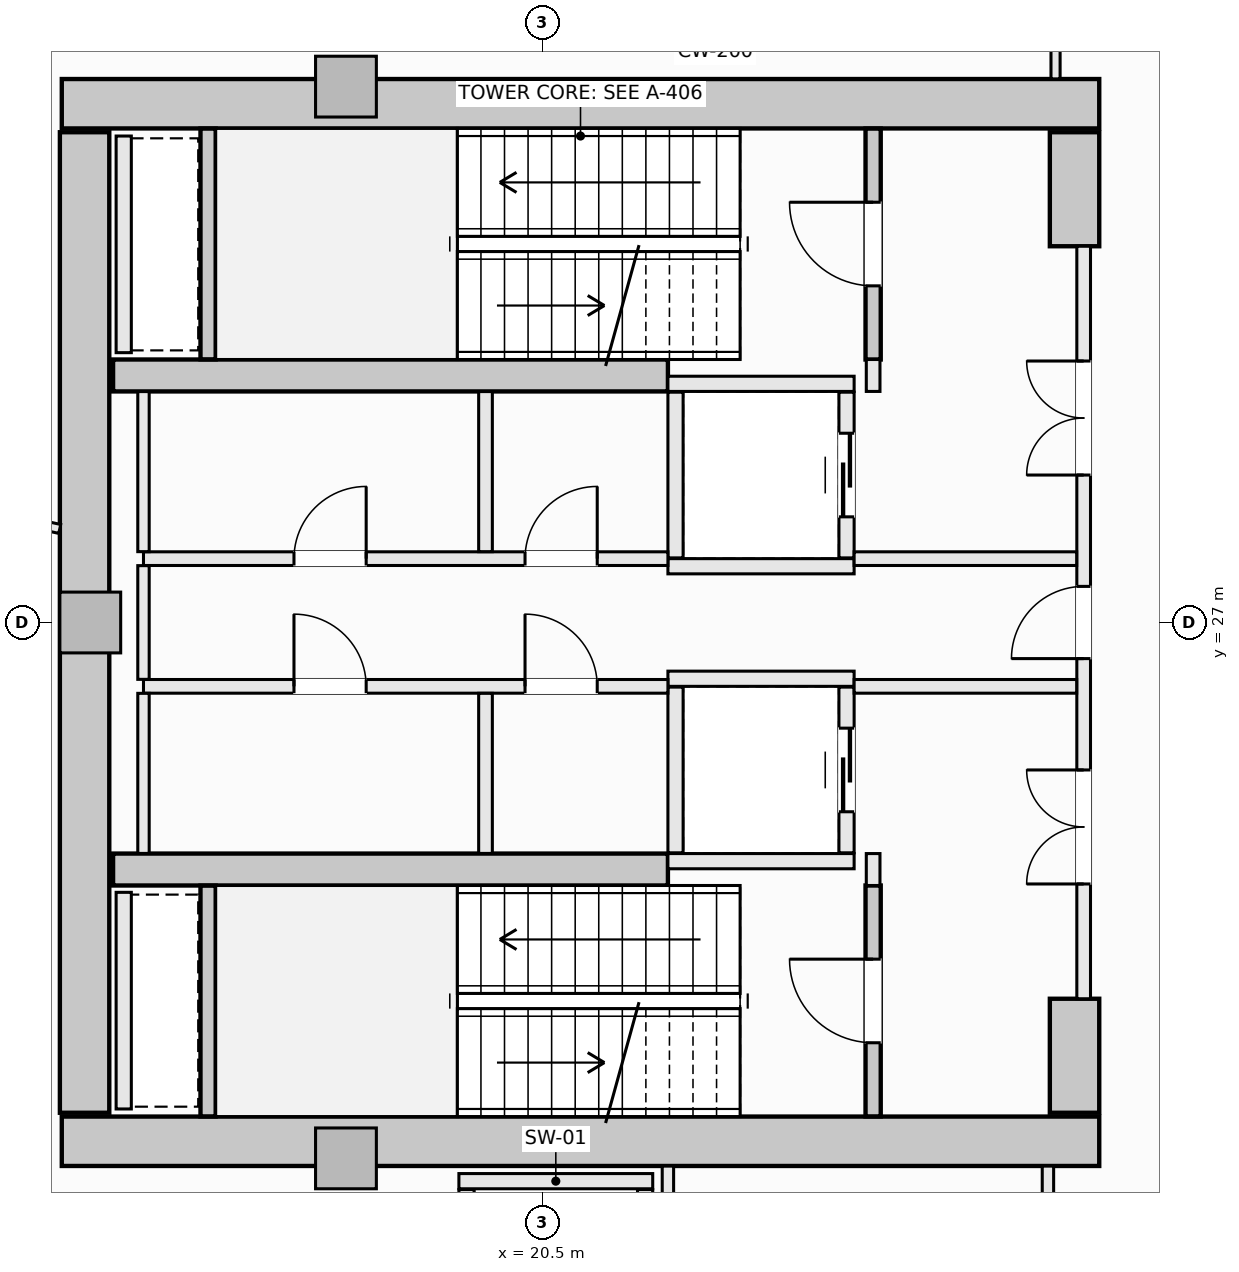
"""IFC4 building model, lengths in metres.
Left out: names, types, materials, properties, quantities, classifications, styles, units other than length and angle.
Written with IfcOpenShell. Run it as: python <this file> out.ifc"""

import sys

from ifc_helpers import new_model, si_unit, direction, frame, frame_2d, origin, origin_2d, place, context, subcontext, project, spatial, rectangle, extrude, element, fill, save


model = new_model("IFC4")
c1 = context("Model", 3, precision=1e-05, world=origin(), true_north=direction((0.0, 1.0)))
c2 = subcontext(c1, "Body", "Model", "MODEL_VIEW")
j1 = project(units=[si_unit("LENGTHUNIT", "METRE"), si_unit("PLANEANGLEUNIT", "RADIAN")], contexts=[c1])
p1 = place(None, origin())
s1 = spatial("IfcSite", under=j1, at=p1, CompositionType="ELEMENT")
p2 = place(p1, origin())
s2 = spatial("IfcBuilding", under=s1, at=p2, CompositionType="ELEMENT")
p3 = place(p2, frame((0.0, 0.0, 100.8)))
s3 = spatial("IfcBuildingStorey", under=s2, at=p3, CompositionType="ELEMENT", Elevation=100.8)
for number, where, z_axis, x_axis in (
    (1, (14.175, 33.825, -0.28), (0.0, 0.0, 1.0), (1.0, 0.0, 0.0)),
    (2, (14.175, 20.175, -0.28), (0.0, 0.0, 1.0), (1.0, 0.0, 0.0)),
):
    element("IfcWall", number, at=place(p3, frame(where, z_axis=z_axis, x_axis=x_axis)), inside=s3, PredefinedType="SHEAR", context=c2, shape_type="SweptSolid", body=[
        extrude(rectangle(XDim=13.65, YDim=0.65, at=frame_2d((6.825, 0.0))), origin(), (0.0, 0.0, 1.0), 4.51),
    ])
p4 = place(p3, frame((14.475, 20.55, -0.28), z_axis=(0.0, 0.0, 1.0), x_axis=(0.0, 1.0, 0.0)))
e3 = element("IfcWall", 3, at=p4, inside=s3, PredefinedType="SHEAR", context=c2, shape_type="SweptSolid", body=[
    extrude(rectangle(XDim=12.9, YDim=0.65, at=frame_2d((6.45, 0.0))), origin(), (0.0, 0.0, 1.0), 4.51),
])
for number, where, z_axis, x_axis in (
    (4, (27.5, 31.95, -0.28), (0.0, 0.0, 1.0), (0.0, 1.0, 0.0)),
    (5, (27.5, 20.55, -0.28), (0.0, 0.0, 1.0), (0.0, 1.0, 0.0)),
):
    element("IfcWall", number, at=place(p3, frame(where, z_axis=z_axis, x_axis=x_axis)), inside=s3, PredefinedType="SHEAR", context=c2, shape_type="SweptSolid", body=[
        extrude(rectangle(XDim=1.5, YDim=0.65, at=frame_2d((0.75, 0.0))), origin(), (0.0, 0.0, 1.0), 4.51),
    ])
for number, where, z_axis, x_axis in (
    (6, (14.85, 30.25, -0.28), (0.0, 0.0, 1.0), (1.0, 0.0, 0.0)),
    (7, (14.85, 23.75, -0.28), (0.0, 0.0, 1.0), (1.0, 0.0, 0.0)),
):
    element("IfcWall", number, at=place(p3, frame(where, z_axis=z_axis, x_axis=x_axis)), inside=s3, PredefinedType="SHEAR", context=c2, shape_type="SweptSolid", body=[
        extrude(rectangle(XDim=7.3, YDim=0.42, at=frame_2d((3.65, 0.0))), origin(), (0.0, 0.0, 1.0), 4.51),
    ])
for number, where, z_axis, x_axis in (
    (8, (17.914, 34.05, -0.28), (0.0, 0.0, 1.0), (1.0, 0.0, 0.0)),
    (9, (14.55, 27.0, -0.28), (0.0, 0.0, 1.0), (1.0, 0.0, 0.0)),
    (10, (17.914, 19.95, -0.28), (0.0, 0.0, 1.0), (1.0, 0.0, 0.0)),
):
    element("IfcColumn", number, at=place(p3, frame(where, z_axis=z_axis, x_axis=x_axis)), inside=s3, PredefinedType="PILASTER", context=c2, shape_type="SweptSolid", body=[
        extrude(rectangle(XDim=0.8, YDim=0.8, at=origin_2d()), origin(), (0.0, 0.0, 1.0), 4.51),
    ])
p5 = place(p3, frame((24.85, 30.46, -0.28), z_axis=(0.0, 0.0, 1.0), x_axis=(0.0, 1.0, 0.0)))
e11 = element("IfcWall", 11, at=p5, inside=s3, PredefinedType="SHEAR", context=c2, shape_type="SweptSolid", body=[
    extrude(rectangle(XDim=3.038, YDim=0.2, at=frame_2d((1.519, 0.0))), origin(), (0.0, 0.0, 1.0), 4.51),
])
p6 = place(p5, frame((0.969, 0.0, 0.28)))
e12 = element("IfcOpeningElement", 12, at=p6, cuts=e11, PredefinedType="OPENING", context=c2, shape_type="SweptSolid", body=[
    extrude(rectangle(XDim=1.1, YDim=2.15, at=frame_2d((0.55, 1.075))), frame((0.0, 0.11, 0.0), z_axis=(0.0, -1.0, 0.0), x_axis=(1.0, 0.0, 0.0)), (0.0, 0.0, 1.0), 0.22),
])
p7 = place(p3, frame((16.1, 30.462, -0.28), z_axis=(0.0, 0.0, 1.0), x_axis=(0.0, 1.0, 0.0)))
e13 = element("IfcWall", 13, at=p7, inside=s3, PredefinedType="SHEAR", context=c2, shape_type="SweptSolid", body=[
    extrude(rectangle(XDim=3.036, YDim=0.2, at=frame_2d((1.518, 0.0))), origin(), (0.0, 0.0, 1.0), 4.51),
])
p8 = place(p3, frame((24.85, 20.502, -0.28), z_axis=(0.0, 0.0, 1.0), x_axis=(0.0, 1.0, 0.0)))
e14 = element("IfcWall", 14, at=p8, inside=s3, PredefinedType="SHEAR", context=c2, shape_type="SweptSolid", body=[
    extrude(rectangle(XDim=3.038, YDim=0.2, at=frame_2d((1.519, 0.0))), origin(), (0.0, 0.0, 1.0), 4.51),
])
p9 = place(p8, frame((0.969, 0.0, 0.28)))
e15 = element("IfcOpeningElement", 15, at=p9, cuts=e14, PredefinedType="OPENING", context=c2, shape_type="SweptSolid", body=[
    extrude(rectangle(XDim=1.1, YDim=2.15, at=frame_2d((0.55, 1.075))), frame((0.0, 0.11, 0.0), z_axis=(0.0, -1.0, 0.0), x_axis=(1.0, 0.0, 0.0)), (0.0, 0.0, 1.0), 0.22),
])
p10 = place(p3, frame((16.1, 20.502, -0.28), z_axis=(0.0, 0.0, 1.0), x_axis=(0.0, 1.0, 0.0)))
e16 = element("IfcWall", 16, at=p10, inside=s3, PredefinedType="SHEAR", context=c2, shape_type="SweptSolid", body=[
    extrude(rectangle(XDim=3.036, YDim=0.2, at=frame_2d((1.518, 0.0))), origin(), (0.0, 0.0, 1.0), 4.51),
])
for number, where, z_axis, x_axis in (
    (17, (22.15, 30.14, 0.0), (0.0, 0.0, 1.0), (1.0, 0.0, 0.0)),
    (18, (22.15, 27.74, 0.0), (0.0, 0.0, 1.0), (1.0, 0.0, 0.0)),
):
    element("IfcWall", number, at=place(p3, frame(where, z_axis=z_axis, x_axis=x_axis)), inside=s3, PredefinedType="SOLIDWALL", context=c2, shape_type="SweptSolid", body=[
        extrude(rectangle(XDim=2.45, YDim=0.2, at=frame_2d((1.225, 0.0))), origin(), (0.0, 0.0, 1.0), 4.23),
    ])
p11 = place(p3, frame((22.25, 27.85, 0.0), z_axis=(0.0, 0.0, 1.0), x_axis=(0.0, 1.0, 0.0)))
e19 = element("IfcWall", 19, at=p11, inside=s3, PredefinedType="SOLIDWALL", context=c2, shape_type="SweptSolid", body=[
    extrude(rectangle(XDim=2.18, YDim=0.2, at=frame_2d((1.09, 0.0))), origin(), (0.0, 0.0, 1.0), 4.23),
])
p12 = place(p3, frame((24.5, 27.85, 0.0), z_axis=(0.0, 0.0, 1.0), x_axis=(0.0, 1.0, 0.0)))
e20 = element("IfcWall", 20, at=p12, inside=s3, PredefinedType="SOLIDWALL", context=c2, shape_type="SweptSolid", body=[
    extrude(rectangle(XDim=2.18, YDim=0.2, at=frame_2d((1.09, 0.0))), origin(), (0.0, 0.0, 1.0), 4.23),
])
p13 = place(p12, frame((0.54, 0.0, 0.0)))
e21 = element("IfcOpeningElement", 21, at=p13, cuts=e20, PredefinedType="OPENING", context=c2, shape_type="SweptSolid", body=[
    extrude(rectangle(XDim=1.1, YDim=2.2, at=frame_2d((0.55, 1.1))), frame((0.0, 0.11, 0.0), z_axis=(0.0, -1.0, 0.0), x_axis=(1.0, 0.0, 0.0)), (0.0, 0.0, 1.0), 0.22),
])
for number, where, z_axis, x_axis in (
    (22, (22.15, 26.26, 0.0), (0.0, 0.0, 1.0), (1.0, 0.0, 0.0)),
    (23, (22.15, 23.86, 0.0), (0.0, 0.0, 1.0), (1.0, 0.0, 0.0)),
):
    element("IfcWall", number, at=place(p3, frame(where, z_axis=z_axis, x_axis=x_axis)), inside=s3, PredefinedType="SOLIDWALL", context=c2, shape_type="SweptSolid", body=[
        extrude(rectangle(XDim=2.45, YDim=0.2, at=frame_2d((1.225, 0.0))), origin(), (0.0, 0.0, 1.0), 4.23),
    ])
p14 = place(p3, frame((22.25, 23.97, 0.0), z_axis=(0.0, 0.0, 1.0), x_axis=(0.0, 1.0, 0.0)))
e24 = element("IfcWall", 24, at=p14, inside=s3, PredefinedType="SOLIDWALL", context=c2, shape_type="SweptSolid", body=[
    extrude(rectangle(XDim=2.18, YDim=0.2, at=frame_2d((1.09, 0.0))), origin(), (0.0, 0.0, 1.0), 4.23),
])
p15 = place(p3, frame((24.5, 23.97, 0.0), z_axis=(0.0, 0.0, 1.0), x_axis=(0.0, 1.0, 0.0)))
e25 = element("IfcWall", 25, at=p15, inside=s3, PredefinedType="SOLIDWALL", context=c2, shape_type="SweptSolid", body=[
    extrude(rectangle(XDim=2.18, YDim=0.2, at=frame_2d((1.09, 0.0))), origin(), (0.0, 0.0, 1.0), 4.23),
])
p16 = place(p15, frame((0.54, 0.0, 0.0)))
e26 = element("IfcOpeningElement", 26, at=p16, cuts=e25, PredefinedType="OPENING", context=c2, shape_type="SweptSolid", body=[
    extrude(rectangle(XDim=1.1, YDim=2.2, at=frame_2d((0.55, 1.1))), frame((0.0, 0.11, 0.0), z_axis=(0.0, -1.0, 0.0), x_axis=(1.0, 0.0, 0.0)), (0.0, 0.0, 1.0), 0.22),
])
p17 = place(p3, frame((19.4, 19.65, 0.0), z_axis=(0.0, 0.0, 1.0), x_axis=(1.0, 0.0, 0.0)))
e27 = element("IfcWall", 27, at=p17, inside=s3, PredefinedType="SOLIDWALL", context=c2, shape_type="SweptSolid", body=[
    extrude(rectangle(XDim=2.55, YDim=0.2, at=frame_2d((1.275, 0.0))), origin(), (0.0, 0.0, 1.0), 4.23),
])
for number, where, z_axis, x_axis in (
    (28, (19.5, 17.01, 0.0), (0.0, 0.0, 1.0), (0.0, 1.0, 0.0)),
    (29, (21.85, 17.01, 0.0), (0.0, 0.0, 1.0), (0.0, 1.0, 0.0)),
):
    element("IfcWall", number, at=place(p3, frame(where, z_axis=z_axis, x_axis=x_axis)), inside=s3, PredefinedType="SOLIDWALL", context=c2, shape_type="SweptSolid", body=[
        extrude(rectangle(XDim=2.53, YDim=0.2, at=frame_2d((1.265, 0.0))), origin(), (0.0, 0.0, 1.0), 4.23),
    ])
for number, where, z_axis, x_axis in (
    (30, (14.99, 30.55, 0.0), (0.0, 0.0, 1.0), (0.0, 1.0, 0.0)),
    (31, (14.99, 20.6, 0.0), (0.0, 0.0, 1.0), (0.0, 1.0, 0.0)),
):
    element("IfcWall", number, at=place(p3, frame(where, z_axis=z_axis, x_axis=x_axis)), inside=s3, PredefinedType="SOLIDWALL", context=c2, shape_type="SweptSolid", body=[
        extrude(rectangle(XDim=2.85, YDim=0.2, at=frame_2d((1.425, 0.0))), origin(), (0.0, 0.0, 1.0), 4.23),
    ])
for number, where, z_axis, x_axis in (
    (32, (24.85, 23.54, 0.0), (0.0, 0.0, 1.0), (0.0, 1.0, 0.0)),
    (33, (24.85, 30.04, 0.0), (0.0, 0.0, 1.0), (0.0, 1.0, 0.0)),
):
    element("IfcWall", number, at=place(p3, frame(where, z_axis=z_axis, x_axis=x_axis)), inside=s3, PredefinedType="SOLIDWALL", context=c2, shape_type="SweptSolid", body=[
        extrude(rectangle(XDim=0.42, YDim=0.18, at=frame_2d((0.21, 0.0))), origin(), (0.0, 0.0, 1.0), 4.23),
    ])
p18 = place(p3, frame((27.62, 22.05, 0.0), z_axis=(0.0, 0.0, 1.0), x_axis=(0.0, 1.0, 0.0)))
e34 = element("IfcWall", 34, at=p18, inside=s3, PredefinedType="SOLIDWALL", context=c2, shape_type="SweptSolid", body=[
    extrude(rectangle(XDim=9.9, YDim=0.18, at=frame_2d((4.95, 0.0))), origin(), (0.0, 0.0, 1.0), 3.322),
])
p19 = place(p18, frame((4.475, 0.0, 0.0)))
e35 = element("IfcOpeningElement", 35, at=p19, cuts=e34, PredefinedType="OPENING", context=c2, shape_type="SweptSolid", body=[
    extrude(rectangle(XDim=0.95, YDim=2.1, at=frame_2d((0.475, 1.05))), frame((0.0, 0.1, 0.0), z_axis=(0.0, -1.0, 0.0), x_axis=(1.0, 0.0, 0.0)), (0.0, 0.0, 1.0), 0.2),
])
p20 = place(p18, frame((6.89, 0.0, 0.0)))
e36 = element("IfcOpeningElement", 36, at=p20, cuts=e34, PredefinedType="OPENING", context=c2, shape_type="SweptSolid", body=[
    extrude(rectangle(XDim=1.5, YDim=2.2, at=frame_2d((0.75, 1.1))), frame((0.0, 0.1, 0.0), z_axis=(0.0, -1.0, 0.0), x_axis=(1.0, 0.0, 0.0)), (0.0, 0.0, 1.0), 0.2),
])
p21 = place(p18, frame((1.51, 0.0, 0.0)))
e37 = element("IfcOpeningElement", 37, at=p21, cuts=e34, PredefinedType="OPENING", context=c2, shape_type="SweptSolid", body=[
    extrude(rectangle(XDim=1.5, YDim=2.2, at=frame_2d((0.75, 1.1))), frame((0.0, 0.1, 0.0), z_axis=(0.0, -1.0, 0.0), x_axis=(1.0, 0.0, 0.0)), (0.0, 0.0, 1.0), 0.2),
])
p22 = place(p3, frame((15.25, 27.84, 0.0), z_axis=(0.0, 0.0, 1.0), x_axis=(1.0, 0.0, 0.0)))
e38 = element("IfcWall", 38, at=p22, inside=s3, PredefinedType="SOLIDWALL", context=c2, shape_type="SweptSolid", body=[
    extrude(rectangle(XDim=6.9, YDim=0.18, at=frame_2d((3.45, 0.0))), origin(), (0.0, 0.0, 1.0), 4.23),
])
p23 = place(p22, frame((5.02, 0.0, 0.0)))
e39 = element("IfcOpeningElement", 39, at=p23, cuts=e38, PredefinedType="OPENING", context=c2, shape_type="SweptSolid", body=[
    extrude(rectangle(XDim=0.95, YDim=2.1, at=frame_2d((0.475, 1.05))), frame((0.0, 0.1, 0.0), z_axis=(0.0, -1.0, 0.0), x_axis=(1.0, 0.0, 0.0)), (0.0, 0.0, 1.0), 0.2),
])
p24 = place(p22, frame((1.98, 0.0, 0.0)))
e40 = element("IfcOpeningElement", 40, at=p24, cuts=e38, PredefinedType="OPENING", context=c2, shape_type="SweptSolid", body=[
    extrude(rectangle(XDim=0.95, YDim=2.1, at=frame_2d((0.475, 1.05))), frame((0.0, 0.1, 0.0), z_axis=(0.0, -1.0, 0.0), x_axis=(1.0, 0.0, 0.0)), (0.0, 0.0, 1.0), 0.2),
])
p25 = place(p3, frame((24.6, 27.84, 0.0), z_axis=(0.0, 0.0, 1.0), x_axis=(1.0, 0.0, 0.0)))
e41 = element("IfcWall", 41, at=p25, inside=s3, PredefinedType="SOLIDWALL", context=c2, shape_type="SweptSolid", body=[
    extrude(rectangle(XDim=2.928, YDim=0.18, at=frame_2d((1.464, 0.0))), origin(), (0.0, 0.0, 1.0), 4.23),
])
p26 = place(p3, frame((15.25, 26.16, 0.0), z_axis=(0.0, 0.0, 1.0), x_axis=(1.0, 0.0, 0.0)))
e42 = element("IfcWall", 42, at=p26, inside=s3, PredefinedType="SOLIDWALL", context=c2, shape_type="SweptSolid", body=[
    extrude(rectangle(XDim=6.9, YDim=0.18, at=frame_2d((3.45, 0.0))), origin(), (0.0, 0.0, 1.0), 4.23),
])
p27 = place(p26, frame((5.02, 0.0, 0.0)))
e43 = element("IfcOpeningElement", 43, at=p27, cuts=e42, PredefinedType="OPENING", context=c2, shape_type="SweptSolid", body=[
    extrude(rectangle(XDim=0.95, YDim=2.1, at=frame_2d((0.475, 1.05))), frame((0.0, 0.1, 0.0), z_axis=(0.0, -1.0, 0.0), x_axis=(1.0, 0.0, 0.0)), (0.0, 0.0, 1.0), 0.2),
])
p28 = place(p26, frame((1.98, 0.0, 0.0)))
e44 = element("IfcOpeningElement", 44, at=p28, cuts=e42, PredefinedType="OPENING", context=c2, shape_type="SweptSolid", body=[
    extrude(rectangle(XDim=0.95, YDim=2.1, at=frame_2d((0.475, 1.05))), frame((0.0, 0.1, 0.0), z_axis=(0.0, -1.0, 0.0), x_axis=(1.0, 0.0, 0.0)), (0.0, 0.0, 1.0), 0.2),
])
p29 = place(p3, frame((24.6, 26.16, 0.0), z_axis=(0.0, 0.0, 1.0), x_axis=(1.0, 0.0, 0.0)))
e45 = element("IfcWall", 45, at=p29, inside=s3, PredefinedType="SOLIDWALL", context=c2, shape_type="SweptSolid", body=[
    extrude(rectangle(XDim=2.928, YDim=0.18, at=frame_2d((1.464, 0.0))), origin(), (0.0, 0.0, 1.0), 4.23),
])
p30 = place(p3, frame((15.25, 23.962, 0.0), z_axis=(0.0, 0.0, 1.0), x_axis=(0.0, 1.0, 0.0)))
e46 = element("IfcWall", 46, at=p30, inside=s3, PredefinedType="PARTITIONING", context=c2, shape_type="SweptSolid", body=[
    extrude(rectangle(XDim=2.106, YDim=0.15, at=frame_2d((1.053, 0.0))), origin(), (0.0, 0.0, 1.0), 4.23),
])
p31 = place(p3, frame((15.25, 26.252, 0.0), z_axis=(0.0, 0.0, 1.0), x_axis=(0.0, 1.0, 0.0)))
e47 = element("IfcWall", 47, at=p31, inside=s3, PredefinedType="PARTITIONING", context=c2, shape_type="SweptSolid", body=[
    extrude(rectangle(XDim=1.496, YDim=0.15, at=frame_2d((0.748, 0.0))), origin(), (0.0, 0.0, 1.0), 4.23),
])
p32 = place(p3, frame((15.25, 27.932, 0.0), z_axis=(0.0, 0.0, 1.0), x_axis=(0.0, 1.0, 0.0)))
e48 = element("IfcWall", 48, at=p32, inside=s3, PredefinedType="PARTITIONING", context=c2, shape_type="SweptSolid", body=[
    extrude(rectangle(XDim=2.106, YDim=0.15, at=frame_2d((1.053, 0.0))), origin(), (0.0, 0.0, 1.0), 4.23),
])
for number, where, z_axis, x_axis in (
    (49, (19.75, 23.962, 0.0), (0.0, 0.0, 1.0), (0.0, 1.0, 0.0)),
    (50, (19.75, 27.932, 0.0), (0.0, 0.0, 1.0), (0.0, 1.0, 0.0)),
):
    element("IfcWall", number, at=place(p3, frame(where, z_axis=z_axis, x_axis=x_axis)), inside=s3, PredefinedType="SOLIDWALL", context=c2, shape_type="SweptSolid", body=[
        extrude(rectangle(XDim=2.106, YDim=0.18, at=frame_2d((1.053, 0.0))), origin(), (0.0, 0.0, 1.0), 4.23),
    ])
p33 = place(p3, frame((22.15, 17.127, 0.0), z_axis=(0.0, 0.0, 1.0), x_axis=(0.0, 1.0, 0.0)))
e51 = element("IfcWall", 51, at=p33, inside=s3, PredefinedType="PARTITIONING", context=c2, shape_type="SweptSolid", body=[
    extrude(rectangle(XDim=2.721, YDim=0.15, at=frame_2d((1.36, 0.0))), origin(), (0.0, 0.0, 1.0), 4.23),
])
p34 = place(p3, frame((27.15, 17.127, 0.0), z_axis=(0.0, 0.0, 1.0), x_axis=(0.0, 1.0, 0.0)))
e52 = element("IfcWall", 52, at=p34, inside=s3, PredefinedType="PARTITIONING", context=c2, shape_type="SweptSolid", body=[
    extrude(rectangle(XDim=2.721, YDim=0.15, at=frame_2d((1.36, 0.0))), origin(), (0.0, 0.0, 1.0), 4.23),
])
p35 = place(p34, frame((0.885, 0.0, 0.0)))
e53 = element("IfcOpeningElement", 53, at=p35, cuts=e52, PredefinedType="OPENING", context=c2, shape_type="SweptSolid", body=[
    extrude(rectangle(XDim=0.95, YDim=2.1, at=frame_2d((0.475, 1.05))), frame((0.0, 0.085, 0.0), z_axis=(0.0, -1.0, 0.0), x_axis=(1.0, 0.0, 0.0)), (0.0, 0.0, 1.0), 0.17),
])
p36 = place(p3, frame((27.25, 34.152, 0.0), z_axis=(0.0, 0.0, 1.0), x_axis=(0.0, 1.0, 0.0)))
e54 = element("IfcWall", 54, at=p36, inside=s3, PredefinedType="PARTITIONING", context=c2, shape_type="SweptSolid", body=[
    extrude(rectangle(XDim=0.806, YDim=0.12, at=frame_2d((0.403, 0.0))), origin(), (0.0, 0.0, 1.0), 4.23),
])
p37 = place(p3, frame((6.567, 29.887, 0.0), z_axis=(0.0, 0.0, 1.0), x_axis=(0.976956632184, -0.213437903927, 0.0)))
e55 = element("IfcWall", 55, at=p37, inside=s3, PredefinedType="PARTITIONING", context=c2, shape_type="SweptSolid", body=[
    extrude(rectangle(XDim=7.76, YDim=0.12, at=frame_2d((3.88, 0.0))), origin(), (0.0, 0.0, 1.0), 4.23),
])
p38 = place(p6, origin())
e56 = element("IfcDoor", 56, at=p38, inside=s3, OperationType="SINGLE_SWING_RIGHT", PredefinedType="DOOR", context=c2, shape_type="SweptSolid", body=[
    extrude(rectangle(XDim=1.1, YDim=2.15, at=frame_2d((0.55, 1.075))), frame((0.0, 0.025, 0.0), z_axis=(0.0, -1.0, 0.0), x_axis=(1.0, 0.0, 0.0)), (0.0, 0.0, 1.0), 0.05),
])
fill(e12, e56)
p39 = place(p9, origin())
e57 = element("IfcDoor", 57, at=p39, inside=s3, OperationType="SINGLE_SWING_RIGHT", PredefinedType="DOOR", context=c2, shape_type="SweptSolid", body=[
    extrude(rectangle(XDim=1.1, YDim=2.15, at=frame_2d((0.55, 1.075))), frame((0.0, 0.025, 0.0), z_axis=(0.0, -1.0, 0.0), x_axis=(1.0, 0.0, 0.0)), (0.0, 0.0, 1.0), 0.05),
])
fill(e15, e57)
p40 = place(p13, origin())
e58 = element("IfcDoor", 58, at=p40, inside=s3, OperationType="SLIDING_TO_LEFT", PredefinedType="DOOR", context=c2, shape_type="SweptSolid", body=[
    extrude(rectangle(XDim=1.1, YDim=2.2, at=frame_2d((0.55, 1.1))), frame((0.0, 0.025, 0.0), z_axis=(0.0, -1.0, 0.0), x_axis=(1.0, 0.0, 0.0)), (0.0, 0.0, 1.0), 0.05),
])
fill(e21, e58)
p41 = place(p16, origin())
e59 = element("IfcDoor", 59, at=p41, inside=s3, OperationType="SLIDING_TO_LEFT", PredefinedType="DOOR", context=c2, shape_type="SweptSolid", body=[
    extrude(rectangle(XDim=1.1, YDim=2.2, at=frame_2d((0.55, 1.1))), frame((0.0, 0.025, 0.0), z_axis=(0.0, -1.0, 0.0), x_axis=(1.0, 0.0, 0.0)), (0.0, 0.0, 1.0), 0.05),
])
fill(e26, e59)
p42 = place(p19, origin())
e60 = element("IfcDoor", 60, at=p42, inside=s3, OperationType="SINGLE_SWING_LEFT", PredefinedType="DOOR", context=c2, shape_type="SweptSolid", body=[
    extrude(rectangle(XDim=0.95, YDim=2.1, at=frame_2d((0.475, 1.05))), frame((0.0, 0.025, 0.0), z_axis=(0.0, -1.0, 0.0), x_axis=(1.0, 0.0, 0.0)), (0.0, 0.0, 1.0), 0.05),
])
fill(e35, e60)
p43 = place(p20, origin())
e61 = element("IfcDoor", 61, at=p43, inside=s3, OperationType="DOUBLE_DOOR_SINGLE_SWING", PredefinedType="DOOR", context=c2, shape_type="SweptSolid", body=[
    extrude(rectangle(XDim=1.5, YDim=2.2, at=frame_2d((0.75, 1.1))), frame((0.0, 0.025, 0.0), z_axis=(0.0, -1.0, 0.0), x_axis=(1.0, 0.0, 0.0)), (0.0, 0.0, 1.0), 0.05),
])
fill(e36, e61)
p44 = place(p21, origin())
e62 = element("IfcDoor", 62, at=p44, inside=s3, OperationType="DOUBLE_DOOR_SINGLE_SWING", PredefinedType="DOOR", context=c2, shape_type="SweptSolid", body=[
    extrude(rectangle(XDim=1.5, YDim=2.2, at=frame_2d((0.75, 1.1))), frame((0.0, 0.025, 0.0), z_axis=(0.0, -1.0, 0.0), x_axis=(1.0, 0.0, 0.0)), (0.0, 0.0, 1.0), 0.05),
])
fill(e37, e62)
p45 = place(p23, origin())
e63 = element("IfcDoor", 63, at=p45, inside=s3, OperationType="SINGLE_SWING_RIGHT", PredefinedType="DOOR", context=c2, shape_type="SweptSolid", body=[
    extrude(rectangle(XDim=0.95, YDim=2.1, at=frame_2d((0.475, 1.05))), frame((0.0, 0.025, 0.0), z_axis=(0.0, -1.0, 0.0), x_axis=(1.0, 0.0, 0.0)), (0.0, 0.0, 1.0), 0.05),
])
fill(e39, e63)
p46 = place(p27, origin())
e64 = element("IfcDoor", 64, at=p46, inside=s3, OperationType="SINGLE_SWING_LEFT", PredefinedType="DOOR", context=c2, shape_type="SweptSolid", body=[
    extrude(rectangle(XDim=0.95, YDim=2.1, at=frame_2d((0.475, 1.05))), frame((0.0, 0.025, 0.0), z_axis=(0.0, -1.0, 0.0), x_axis=(1.0, 0.0, 0.0)), (0.0, 0.0, 1.0), 0.05),
])
fill(e43, e64)
p47 = place(p24, origin())
e65 = element("IfcDoor", 65, at=p47, inside=s3, OperationType="SINGLE_SWING_RIGHT", PredefinedType="DOOR", context=c2, shape_type="SweptSolid", body=[
    extrude(rectangle(XDim=0.95, YDim=2.1, at=frame_2d((0.475, 1.05))), frame((0.0, 0.025, 0.0), z_axis=(0.0, -1.0, 0.0), x_axis=(1.0, 0.0, 0.0)), (0.0, 0.0, 1.0), 0.05),
])
fill(e40, e65)
p48 = place(p28, origin())
e66 = element("IfcDoor", 66, at=p48, inside=s3, OperationType="SINGLE_SWING_LEFT", PredefinedType="DOOR", context=c2, shape_type="SweptSolid", body=[
    extrude(rectangle(XDim=0.95, YDim=2.1, at=frame_2d((0.475, 1.05))), frame((0.0, 0.025, 0.0), z_axis=(0.0, -1.0, 0.0), x_axis=(1.0, 0.0, 0.0)), (0.0, 0.0, 1.0), 0.05),
])
fill(e44, e66)
save(model, sys.argv[1])
